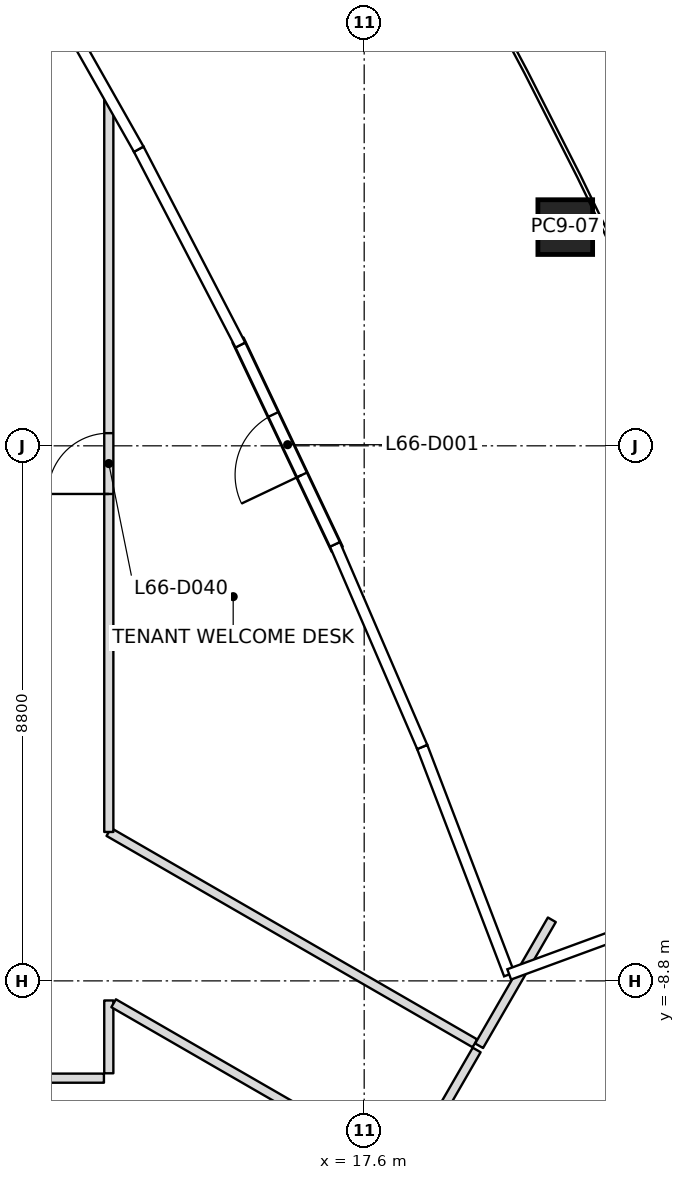
"""IFC4 building model, lengths in metres.
Left out: names, types, materials, properties, quantities, classifications, styles, units other than length and angle.
Written with IfcOpenShell. Run it as: python <this file> out.ifc"""

import sys

from ifc_helpers import new_model, si_unit, direction, frame, frame_2d, origin, origin_2d, place, context, subcontext, project, spatial, rectangle, extrude, element, fill, save


model = new_model("IFC4")
c1 = context("Model", 3, precision=1e-05, world=origin(), true_north=direction((0.0, 1.0)))
c2 = subcontext(c1, "Body", "Model", "MODEL_VIEW")
j1 = project(units=[si_unit("LENGTHUNIT", "METRE"), si_unit("PLANEANGLEUNIT", "RADIAN")], contexts=[c1])
p1 = place(None, origin())
s1 = spatial("IfcSite", under=j1, at=p1, CompositionType="ELEMENT")
p2 = place(p1, origin())
s2 = spatial("IfcBuilding", under=s1, at=p2, CompositionType="ELEMENT")
p3 = place(p2, frame((0.0, 0.0, 291.0)))
s3 = spatial("IfcBuildingStorey", under=s2, at=p3, CompositionType="ELEMENT", Elevation=291.0)
p4 = place(p3, frame((20.622, -11.906, 0.0), z_axis=(-0.027756720281, 0.01604399436, 0.999485945236), x_axis=(0.999614708015, 0.000445500311, 0.027753144871)))
e1 = element("IfcColumn", 1, at=p4, inside=s3, PredefinedType="COLUMN", context=c2, shape_type="SweptSolid", body=[
    extrude(rectangle(XDim=2.2, YDim=2.2, at=origin_2d()), origin(), (0.0, 0.0, 1.0), 4.002),
])
p5 = place(p3, frame((20.907, 3.597, 0.0), z_axis=(-0.014097691364, 0.002013955909, 0.999898594398), x_axis=(-0.439213591989, 0.89834703181, -0.008001940417)))
e2 = element("IfcColumn", 2, at=p5, inside=s3, PredefinedType="COLUMN", context=c2, shape_type="SweptSolid", body=[
    extrude(rectangle(XDim=0.9, YDim=0.9, at=origin_2d()), origin(), (0.0, 0.0, 1.0), 4.0),
])
p6 = place(p3, frame((17.157, -1.702, 0.0), z_axis=(0.0, 0.0, 1.0), x_axis=(-0.428450031592, 0.903565476559, 0.0)))
e3 = element("IfcWall", 3, at=p6, inside=s3, PredefinedType="SOLIDWALL", context=c2, shape_type="SweptSolid", body=[
    extrude(rectangle(XDim=3.809, YDim=0.2, at=frame_2d((1.904, 0.0))), origin(), (0.0, 0.0, 1.0), 3.317),
])
p7 = place(p6, frame((1.354, 0.0, 0.0)))
e4 = element("IfcOpeningElement", 4, at=p7, cuts=e3, PredefinedType="OPENING", context=c2, shape_type="SweptSolid", body=[
    extrude(rectangle(XDim=1.1, YDim=2.1, at=frame_2d((0.55, 1.05))), frame((0.0, 0.1, 0.0), z_axis=(0.0, -1.0, 0.0), x_axis=(1.0, 0.0, 0.0)), (0.0, 0.0, 1.0), 0.2),
])
p8 = place(p3, frame((19.49, -9.867, 0.0), z_axis=(0.0, 0.0, 1.0), x_axis=(0.500046351717, 0.865998640954, 0.0)))
e5 = element("IfcWall", 5, at=p8, inside=s3, PredefinedType="PARTITIONING", context=c2, shape_type="SweptSolid", body=[
    extrude(rectangle(XDim=2.392, YDim=0.15, at=frame_2d((1.196, 0.0))), origin(), (0.0, 0.0, 1.0), 3.45),
])
p9 = place(p3, frame((1.2, -10.4, 0.0), z_axis=(0.0, 0.0, 1.0), x_axis=(1.0, 0.0, 0.0)))
e6 = element("IfcWall", 6, at=p9, inside=s3, PredefinedType="PARTITIONING", context=c2, shape_type="SweptSolid", body=[
    extrude(rectangle(XDim=12.12, YDim=0.15, at=frame_2d((6.06, 0.0))), origin(), (0.0, 0.0, 1.0), 3.393),
])
p10 = place(p9, frame((1.05, 0.0, 0.0)))
e7 = element("IfcOpeningElement", 7, at=p10, cuts=e6, PredefinedType="OPENING", context=c2, shape_type="SweptSolid", body=[
    extrude(rectangle(XDim=0.9, YDim=2.1, at=frame_2d((0.45, 1.05))), frame((0.0, 0.075, 0.0), z_axis=(0.0, -1.0, 0.0), x_axis=(1.0, 0.0, 0.0)), (0.0, 0.0, 1.0), 0.15),
])
p11 = place(p9, frame((7.15, 0.0, 0.0)))
e8 = element("IfcOpeningElement", 8, at=p11, cuts=e6, PredefinedType="OPENING", context=c2, shape_type="SweptSolid", body=[
    extrude(rectangle(XDim=1.0, YDim=2.1, at=frame_2d((0.5, 1.05))), frame((0.0, 0.075, 0.0), z_axis=(0.0, -1.0, 0.0), x_axis=(1.0, 0.0, 0.0)), (0.0, 0.0, 1.0), 0.15),
])
p12 = place(p3, frame((13.4, -10.32, 0.0), z_axis=(0.0, 0.0, 1.0), x_axis=(0.0, 1.0, 0.0)))
e9 = element("IfcWall", 9, at=p12, inside=s3, PredefinedType="PARTITIONING", context=c2, shape_type="SweptSolid", body=[
    extrude(rectangle(XDim=1.198, YDim=0.15, at=frame_2d((0.599, 0.0))), origin(), (0.0, 0.0, 1.0), 3.233),
])
p13 = place(p3, frame((13.479, -9.168, 0.0), z_axis=(0.0, 0.0, 1.0), x_axis=(0.866019989099, -0.500009378393, 0.0)))
e10 = element("IfcWall", 10, at=p13, inside=s3, PredefinedType="PARTITIONING", context=c2, shape_type="SweptSolid", body=[
    extrude(rectangle(XDim=5.475, YDim=0.15, at=frame_2d((2.738, 0.0))), origin(), (0.0, 0.0, 1.0), 3.233),
])
p14 = place(p3, frame((19.421, -9.827, 0.0), z_axis=(0.0, 0.0, 1.0), x_axis=(-0.8660347147, 0.499983872674, 0.0)))
e11 = element("IfcWall", 11, at=p14, inside=s3, PredefinedType="PARTITIONING", context=c2, shape_type="SweptSolid", body=[
    extrude(rectangle(XDim=6.952, YDim=0.15, at=frame_2d((3.476, 0.0))), origin(), (0.0, 0.0, 1.0), 3.317),
])
p15 = place(p3, frame((13.4, -6.351, 0.0), z_axis=(0.0, 0.0, 1.0), x_axis=(0.0, 1.0, 0.0)))
e12 = element("IfcWall", 12, at=p15, inside=s3, PredefinedType="PARTITIONING", context=c2, shape_type="SweptSolid", body=[
    extrude(rectangle(XDim=12.118, YDim=0.15, at=frame_2d((6.059, 0.0))), origin(), (0.0, 0.0, 1.0), 3.317),
])
p16 = place(p15, frame((5.559, 0.0, 0.0)))
e13 = element("IfcOpeningElement", 13, at=p16, cuts=e12, PredefinedType="OPENING", context=c2, shape_type="SweptSolid", body=[
    extrude(rectangle(XDim=1.0, YDim=2.1, at=frame_2d((0.5, 1.05))), frame((0.0, 0.075, 0.0), z_axis=(0.0, -1.0, 0.0), x_axis=(1.0, 0.0, 0.0)), (0.0, 0.0, 1.0), 0.15),
])
p17 = place(p3, frame((18.33, -11.876, 0.0), z_axis=(0.0, 0.0, 1.0), x_axis=(0.500030632641, 0.866007717299, 0.0)))
e14 = element("IfcWall", 14, at=p17, inside=s3, PredefinedType="PARTITIONING", context=c2, shape_type="SweptSolid", body=[
    extrude(rectangle(XDim=2.24, YDim=0.15, at=frame_2d((1.12, 0.0))), origin(), (0.0, 0.0, 1.0), 3.233),
])
p18 = place(p7, origin())
e15 = element("IfcDoor", 15, at=p18, inside=s3, OperationType="SINGLE_SWING_LEFT", PredefinedType="DOOR", context=c2, shape_type="SweptSolid", body=[
    extrude(rectangle(XDim=1.1, YDim=2.1, at=frame_2d((0.55, 1.05))), frame((0.0, 0.025, 0.0), z_axis=(0.0, -1.0, 0.0), x_axis=(1.0, 0.0, 0.0)), (0.0, 0.0, 1.0), 0.05),
])
fill(e4, e15)
p19 = place(p16, origin())
e16 = element("IfcDoor", 16, at=p19, inside=s3, OperationType="SINGLE_SWING_LEFT", PredefinedType="DOOR", context=c2, shape_type="SweptSolid", body=[
    extrude(rectangle(XDim=1.0, YDim=2.1, at=frame_2d((0.5, 1.05))), frame((0.0, 0.025, 0.0), z_axis=(0.0, -1.0, 0.0), x_axis=(1.0, 0.0, 0.0)), (0.0, 0.0, 1.0), 0.05),
])
fill(e13, e16)
save(model, sys.argv[1])
